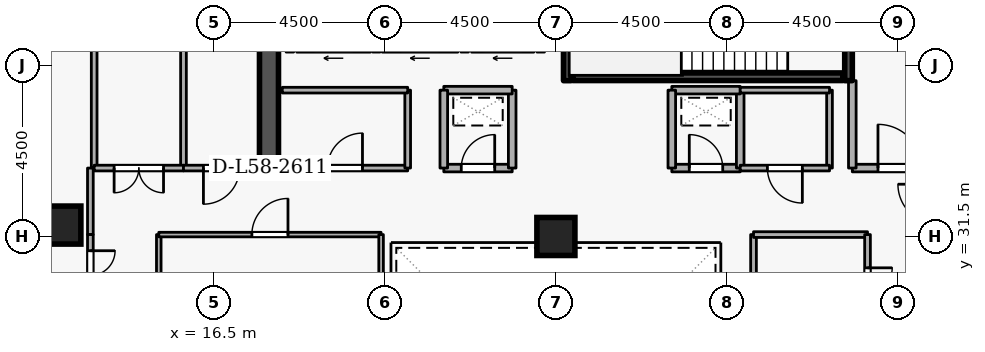
"""IFC4 building model, lengths in metres.
Left out: names, types, materials, properties, quantities, classifications, styles, units other than length and angle.
Written with IfcOpenShell. Run it as: python <this file> out.ifc"""

import sys

from ifc_helpers import new_model, si_unit, direction, frame, frame_2d, origin, origin_2d, place, context, subcontext, project, spatial, rectangle, extrude, element, fill, save


model = new_model("IFC4")
c1 = context("Model", 3, precision=1e-05, world=origin(), true_north=direction((0.0, 1.0)))
c2 = subcontext(c1, "Body", "Model", "MODEL_VIEW")
j1 = project(units=[si_unit("LENGTHUNIT", "METRE"), si_unit("PLANEANGLEUNIT", "RADIAN")], contexts=[c1])
p1 = place(None, origin())
s1 = spatial("IfcSite", under=j1, at=p1, CompositionType="ELEMENT")
p2 = place(p1, origin())
s2 = spatial("IfcBuilding", under=s1, at=p2, CompositionType="ELEMENT")
p3 = place(p2, frame((0.0, 0.0, 218.1)))
s3 = spatial("IfcBuildingStorey", under=s2, at=p3, CompositionType="ELEMENT", Elevation=218.1)
p4 = place(p3, frame((17.95, 33.1, 0.0), z_axis=(0.0, 0.0, 1.0), x_axis=(0.0, 1.0, 0.0)))
e1 = element("IfcWall", 1, at=p4, inside=s3, PredefinedType="SHEAR", context=c2, shape_type="SweptSolid", body=[
    extrude(rectangle(XDim=5.8, YDim=0.5, at=frame_2d((2.9, 0.0))), origin(), (0.0, 0.0, 1.0), 3.6),
])
for number, where, z_axis, x_axis in (
    (2, (12.5, 31.8, 0.0), (0.0, 0.0, 1.0), (1.0, 0.0, 0.0)),
    (3, (25.5, 31.5, 0.0), (0.0, 0.0, 1.0), (1.0, 0.0, 0.0)),
):
    element("IfcColumn", number, at=place(p3, frame(where, z_axis=z_axis, x_axis=x_axis)), inside=s3, PredefinedType="COLUMN", context=c2, shape_type="SweptSolid", body=[
        extrude(rectangle(XDim=1.0, YDim=1.0, at=origin_2d()), origin(), (0.0, 0.0, 1.0), 3.6),
    ])
p5 = place(p3, frame((24.92, 36.45, 0.0), z_axis=(0.0, 0.0, 1.0), x_axis=(-1.0, 0.0, 0.0)))
e4 = element("IfcWall", 4, at=p5, inside=s3, PredefinedType="STANDARD", context=c2, shape_type="SweptSolid", body=[
    extrude(rectangle(XDim=1.64, YDim=0.2, at=frame_2d((0.82, 0.0))), origin(), (0.0, 0.0, 1.0), 3.26),
])
p6 = place(p5, frame((0.31, 0.0, 0.0)))
e5 = element("IfcOpeningElement", 5, at=p6, cuts=e4, PredefinedType="OPENING", context=c2, shape_type="SweptSolid", body=[
    extrude(rectangle(XDim=1.02, YDim=2.06, at=frame_2d((0.51, 1.03))), frame((0.0, 0.11, 0.0), z_axis=(0.0, -1.0, 0.0), x_axis=(1.0, 0.0, 0.0)), (0.0, 0.0, 1.0), 0.22),
])
p7 = place(p3, frame((22.92, 36.45, 0.0), z_axis=(0.0, 0.0, 1.0), x_axis=(-1.0, 0.0, 0.0)))
e6 = element("IfcWall", 6, at=p7, inside=s3, PredefinedType="STANDARD", context=c2, shape_type="SweptSolid", body=[
    extrude(rectangle(XDim=1.99, YDim=0.2, at=frame_2d((0.995, 0.0))), origin(), (0.0, 0.0, 1.0), 3.26),
])
p8 = place(p7, frame((0.485, 0.0, 0.0)))
e7 = element("IfcOpeningElement", 7, at=p8, cuts=e6, PredefinedType="OPENING", context=c2, shape_type="SweptSolid", body=[
    extrude(rectangle(XDim=1.02, YDim=2.06, at=frame_2d((0.51, 1.03))), frame((0.0, 0.11, 0.0), z_axis=(0.0, -1.0, 0.0), x_axis=(1.0, 0.0, 0.0)), (0.0, 0.0, 1.0), 0.22),
])
p9 = place(p3, frame((20.62, 36.45, 0.0), z_axis=(0.0, 0.0, 1.0), x_axis=(-1.0, 0.0, 0.0)))
e8 = element("IfcWall", 8, at=p9, inside=s3, PredefinedType="STANDARD", context=c2, shape_type="SweptSolid", body=[
    extrude(rectangle(XDim=1.94, YDim=0.2, at=frame_2d((0.97, 0.0))), origin(), (0.0, 0.0, 1.0), 3.26),
])
p10 = place(p9, frame((0.46, 0.0, 0.0)))
e9 = element("IfcOpeningElement", 9, at=p10, cuts=e8, PredefinedType="OPENING", context=c2, shape_type="SweptSolid", body=[
    extrude(rectangle(XDim=1.02, YDim=2.06, at=frame_2d((0.51, 1.03))), frame((0.0, 0.11, 0.0), z_axis=(0.0, -1.0, 0.0), x_axis=(1.0, 0.0, 0.0)), (0.0, 0.0, 1.0), 0.22),
])
p11 = place(p3, frame((33.2, 38.95, 0.0), z_axis=(0.0, 0.0, 1.0), x_axis=(0.0, -1.0, 0.0)))
e10 = element("IfcWall", 10, at=p11, inside=s3, PredefinedType="SHEAR", context=c2, shape_type="SweptSolid", body=[
    extrude(rectangle(XDim=3.35, YDim=0.2, at=frame_2d((1.675, 0.0))), origin(), (0.0, 0.0, 1.0), 3.6),
])
p12 = place(p11, frame((1.125, 0.0, 0.0)))
e11 = element("IfcOpeningElement", 11, at=p12, cuts=e10, PredefinedType="OPENING", context=c2, shape_type="SweptSolid", body=[
    extrude(rectangle(XDim=1.1, YDim=2.1, at=frame_2d((0.55, 1.05))), frame((0.0, 0.11, 0.0), z_axis=(0.0, -1.0, 0.0), x_axis=(1.0, 0.0, 0.0)), (0.0, 0.0, 1.0), 0.22),
])
p13 = place(p3, frame((25.8, 35.6, 0.0), z_axis=(0.0, 0.0, 1.0), x_axis=(0.0, 1.0, 0.0)))
e12 = element("IfcWall", 12, at=p13, inside=s3, PredefinedType="SHEAR", context=c2, shape_type="SweptSolid", body=[
    extrude(rectangle(XDim=3.35, YDim=0.2, at=frame_2d((1.675, 0.0))), origin(), (0.0, 0.0, 1.0), 3.6),
])
p14 = place(p3, frame((25.95, 35.703, 0.0), z_axis=(0.0, 0.0, 1.0), x_axis=(1.0, 0.0, 0.0)))
e13 = element("IfcWall", 13, at=p14, inside=s3, PredefinedType="SHEAR", context=c2, shape_type="SweptSolid", body=[
    extrude(rectangle(XDim=7.1, YDim=0.2, at=frame_2d((3.55, 0.0))), origin(), (0.0, 0.0, 1.0), 3.6),
])
p15 = place(p3, frame((33.3, 33.3, 0.0), z_axis=(0.0, 0.0, 1.0), x_axis=(1.0, 0.0, 0.0)))
e14 = element("IfcWall", 14, at=p15, inside=s3, PredefinedType="STANDARD", context=c2, shape_type="SweptSolid", body=[
    extrude(rectangle(XDim=2.5, YDim=0.2, at=frame_2d((1.25, 0.0))), origin(), (0.0, 0.0, 1.0), 3.26),
])
p16 = place(p15, frame((0.675, 0.0, 0.0)))
e15 = element("IfcOpeningElement", 15, at=p16, cuts=e14, PredefinedType="OPENING", context=c2, shape_type="SweptSolid", body=[
    extrude(rectangle(XDim=1.15, YDim=2.1, at=frame_2d((0.575, 1.05))), frame((0.0, 0.11, 0.0), z_axis=(0.0, -1.0, 0.0), x_axis=(1.0, 0.0, 0.0)), (0.0, 0.0, 1.0), 0.22),
])
p17 = place(p3, frame((33.3, 35.6, 0.0), z_axis=(0.0, 0.0, 1.0), x_axis=(0.0, -1.0, 0.0)))
e16 = element("IfcWall", 16, at=p17, inside=s3, PredefinedType="STANDARD", context=c2, shape_type="SweptSolid", body=[
    extrude(rectangle(XDim=2.3, YDim=0.2, at=frame_2d((1.15, 0.0))), origin(), (0.0, 0.0, 1.0), 2.465),
])
p18 = place(p3, frame((22.55, 33.3, 0.0), z_axis=(0.0, 0.0, 1.0), x_axis=(1.0, 0.0, 0.0)))
e17 = element("IfcWall", 17, at=p18, inside=s3, PredefinedType="STANDARD", context=c2, shape_type="SweptSolid", body=[
    extrude(rectangle(XDim=1.8, YDim=0.2, at=frame_2d((0.9, 0.0))), origin(), (0.0, 0.0, 1.0), 3.26),
])
p19 = place(p18, frame((0.46, 0.0, 0.0)))
e18 = element("IfcOpeningElement", 18, at=p19, cuts=e17, PredefinedType="OPENING", context=c2, shape_type="SweptSolid", body=[
    extrude(rectangle(XDim=0.88, YDim=2.04, at=frame_2d((0.44, 1.02))), frame((0.0, 0.11, 0.0), z_axis=(0.0, -1.0, 0.0), x_axis=(1.0, 0.0, 0.0)), (0.0, 0.0, 1.0), 0.22),
])
p20 = place(p3, frame((24.35, 33.3, 0.0), z_axis=(0.0, 0.0, 1.0), x_axis=(0.0, 1.0, 0.0)))
e19 = element("IfcWall", 19, at=p20, inside=s3, PredefinedType="STANDARD", context=c2, shape_type="SweptSolid", body=[
    extrude(rectangle(XDim=2.05, YDim=0.2, at=frame_2d((1.025, 0.0))), origin(), (0.0, 0.0, 1.0), 3.26),
])
p21 = place(p3, frame((24.35, 35.35, 0.0), z_axis=(0.0, 0.0, 1.0), x_axis=(-1.0, 0.0, 0.0)))
e20 = element("IfcWall", 20, at=p21, inside=s3, PredefinedType="STANDARD", context=c2, shape_type="SweptSolid", body=[
    extrude(rectangle(XDim=1.8, YDim=0.2, at=frame_2d((0.9, 0.0))), origin(), (0.0, 0.0, 1.0), 3.26),
])
p22 = place(p3, frame((22.55, 35.35, 0.0), z_axis=(0.0, 0.0, 1.0), x_axis=(0.0, -1.0, 0.0)))
e21 = element("IfcWall", 21, at=p22, inside=s3, PredefinedType="STANDARD", context=c2, shape_type="SweptSolid", body=[
    extrude(rectangle(XDim=2.05, YDim=0.2, at=frame_2d((1.025, 0.0))), origin(), (0.0, 0.0, 1.0), 3.26),
])
p23 = place(p3, frame((28.55, 33.3, 0.0), z_axis=(0.0, 0.0, 1.0), x_axis=(1.0, 0.0, 0.0)))
e22 = element("IfcWall", 22, at=p23, inside=s3, PredefinedType="STANDARD", context=c2, shape_type="SweptSolid", body=[
    extrude(rectangle(XDim=1.8, YDim=0.2, at=frame_2d((0.9, 0.0))), origin(), (0.0, 0.0, 1.0), 3.26),
])
p24 = place(p23, frame((0.46, 0.0, 0.0)))
e23 = element("IfcOpeningElement", 23, at=p24, cuts=e22, PredefinedType="OPENING", context=c2, shape_type="SweptSolid", body=[
    extrude(rectangle(XDim=0.88, YDim=2.04, at=frame_2d((0.44, 1.02))), frame((0.0, 0.11, 0.0), z_axis=(0.0, -1.0, 0.0), x_axis=(1.0, 0.0, 0.0)), (0.0, 0.0, 1.0), 0.22),
])
p25 = place(p3, frame((30.35, 33.3, 0.0), z_axis=(0.0, 0.0, 1.0), x_axis=(0.0, 1.0, 0.0)))
e24 = element("IfcWall", 24, at=p25, inside=s3, PredefinedType="STANDARD", context=c2, shape_type="SweptSolid", body=[
    extrude(rectangle(XDim=2.05, YDim=0.2, at=frame_2d((1.025, 0.0))), origin(), (0.0, 0.0, 1.0), 3.26),
])
p26 = place(p3, frame((30.35, 35.35, 0.0), z_axis=(0.0, 0.0, 1.0), x_axis=(-1.0, 0.0, 0.0)))
e25 = element("IfcWall", 25, at=p26, inside=s3, PredefinedType="STANDARD", context=c2, shape_type="SweptSolid", body=[
    extrude(rectangle(XDim=1.8, YDim=0.2, at=frame_2d((0.9, 0.0))), origin(), (0.0, 0.0, 1.0), 3.26),
])
p27 = place(p3, frame((28.55, 35.35, 0.0), z_axis=(0.0, 0.0, 1.0), x_axis=(0.0, -1.0, 0.0)))
e26 = element("IfcWall", 26, at=p27, inside=s3, PredefinedType="STANDARD", context=c2, shape_type="SweptSolid", body=[
    extrude(rectangle(XDim=2.05, YDim=0.2, at=frame_2d((1.025, 0.0))), origin(), (0.0, 0.0, 1.0), 3.26),
])
p28 = place(p3, frame((18.3, 33.3, 0.0), z_axis=(0.0, 0.0, 1.0), x_axis=(1.0, 0.0, 0.0)))
e27 = element("IfcWall", 27, at=p28, inside=s3, PredefinedType="PARTITIONING", context=c2, shape_type="SweptSolid", body=[
    extrude(rectangle(XDim=3.3, YDim=0.15, at=frame_2d((1.65, 0.0))), origin(), (0.0, 0.0, 1.0), 3.26),
])
p29 = place(p28, frame((1.19, 0.0, 0.0)))
e28 = element("IfcOpeningElement", 28, at=p29, cuts=e27, PredefinedType="OPENING", context=c2, shape_type="SweptSolid", body=[
    extrude(rectangle(XDim=0.92, YDim=2.08, at=frame_2d((0.46, 1.04))), frame((0.0, 0.085, 0.0), z_axis=(0.0, -1.0, 0.0), x_axis=(1.0, 0.0, 0.0)), (0.0, 0.0, 1.0), 0.17),
])
p30 = place(p3, frame((21.6, 33.3, 0.0), z_axis=(0.0, 0.0, 1.0), x_axis=(0.0, 1.0, 0.0)))
e29 = element("IfcWall", 29, at=p30, inside=s3, PredefinedType="PARTITIONING", context=c2, shape_type="SweptSolid", body=[
    extrude(rectangle(XDim=2.05, YDim=0.15, at=frame_2d((1.025, 0.0))), origin(), (0.0, 0.0, 1.0), 3.26),
])
p31 = place(p3, frame((21.6, 35.35, 0.0), z_axis=(0.0, 0.0, 1.0), x_axis=(-1.0, 0.0, 0.0)))
e30 = element("IfcWall", 30, at=p31, inside=s3, PredefinedType="PARTITIONING", context=c2, shape_type="SweptSolid", body=[
    extrude(rectangle(XDim=3.3, YDim=0.15, at=frame_2d((1.65, 0.0))), origin(), (0.0, 0.0, 1.0), 3.26),
])
p32 = place(p3, frame((32.7, 35.35, 0.0), z_axis=(0.0, 0.0, 1.0), x_axis=(0.0, -1.0, 0.0)))
e31 = element("IfcWall", 31, at=p32, inside=s3, PredefinedType="PARTITIONING", context=c2, shape_type="SweptSolid", body=[
    extrude(rectangle(XDim=2.05, YDim=0.15, at=frame_2d((1.025, 0.0))), origin(), (0.0, 0.0, 1.0), 2.465),
])
p33 = place(p3, frame((32.7, 33.3, 0.0), z_axis=(0.0, 0.0, 1.0), x_axis=(-1.0, 0.0, 0.0)))
e32 = element("IfcWall", 32, at=p33, inside=s3, PredefinedType="PARTITIONING", context=c2, shape_type="SweptSolid", body=[
    extrude(rectangle(XDim=2.35, YDim=0.15, at=frame_2d((1.175, 0.0))), origin(), (0.0, 0.0, 1.0), 3.26),
])
p34 = place(p33, frame((0.715, 0.0, 0.0)))
e33 = element("IfcOpeningElement", 33, at=p34, cuts=e32, PredefinedType="OPENING", context=c2, shape_type="SweptSolid", body=[
    extrude(rectangle(XDim=0.92, YDim=2.08, at=frame_2d((0.46, 1.04))), frame((0.0, 0.085, 0.0), z_axis=(0.0, -1.0, 0.0), x_axis=(1.0, 0.0, 0.0)), (0.0, 0.0, 1.0), 0.17),
])
p35 = place(p3, frame((30.35, 35.35, 0.0), z_axis=(0.0, 0.0, 1.0), x_axis=(1.0, 0.0, 0.0)))
e34 = element("IfcWall", 34, at=p35, inside=s3, PredefinedType="PARTITIONING", context=c2, shape_type="SweptSolid", body=[
    extrude(rectangle(XDim=2.35, YDim=0.15, at=frame_2d((1.175, 0.0))), origin(), (0.0, 0.0, 1.0), 3.26),
])
for number, where, z_axis, x_axis in (
    (35, (13.35, 33.3, 0.0), (0.0, 0.0, 1.0), (0.0, 1.0, 0.0)),
    (36, (15.7, 50.72, 0.0), (0.0, 0.0, 1.0), (0.0, -1.0, 0.0)),
):
    element("IfcWall", number, at=place(p3, frame(where, z_axis=z_axis, x_axis=x_axis)), inside=s3, PredefinedType="PARTITIONING", context=c2, shape_type="SweptSolid", body=[
        extrude(rectangle(XDim=17.42, YDim=0.15, at=frame_2d((8.71, 0.0))), origin(), (0.0, 0.0, 1.0), 3.26),
    ])
p36 = place(p3, frame((15.7, 33.3, 0.0), z_axis=(0.0, 0.0, 1.0), x_axis=(-1.0, 0.0, 0.0)))
e37 = element("IfcWall", 37, at=p36, inside=s3, PredefinedType="PARTITIONING", context=c2, shape_type="SweptSolid", body=[
    extrude(rectangle(XDim=2.35, YDim=0.15, at=frame_2d((1.175, 0.0))), origin(), (0.0, 0.0, 1.0), 3.26),
])
p37 = place(p36, frame((0.525, 0.0, 0.0)))
e38 = element("IfcOpeningElement", 38, at=p37, cuts=e37, PredefinedType="OPENING", context=c2, shape_type="SweptSolid", body=[
    extrude(rectangle(XDim=1.3, YDim=2.12, at=frame_2d((0.65, 1.06))), frame((0.0, 0.085, 0.0), z_axis=(0.0, -1.0, 0.0), x_axis=(1.0, 0.0, 0.0)), (0.0, 0.0, 1.0), 0.17),
])
p38 = place(p3, frame((17.7, 33.3, 0.0), z_axis=(0.0, 0.0, 1.0), x_axis=(-1.0, 0.0, 0.0)))
e39 = element("IfcWall", 39, at=p38, inside=s3, PredefinedType="PARTITIONING", context=c2, shape_type="SweptSolid", body=[
    extrude(rectangle(XDim=2.0, YDim=0.15, at=frame_2d((1.0, 0.0))), origin(), (0.0, 0.0, 1.0), 3.26),
])
p39 = place(p38, frame((0.525, 0.0, 0.0)))
e40 = element("IfcOpeningElement", 40, at=p39, cuts=e39, PredefinedType="OPENING", context=c2, shape_type="SweptSolid", body=[
    extrude(rectangle(XDim=0.95, YDim=2.1, at=frame_2d((0.475, 1.05))), frame((0.0, 0.085, 0.0), z_axis=(0.0, -1.0, 0.0), x_axis=(1.0, 0.0, 0.0)), (0.0, 0.0, 1.0), 0.17),
])
p40 = place(p3, frame((13.25, 33.3, 0.0), z_axis=(0.0, 0.0, 1.0), x_axis=(0.0, -1.0, 0.0)))
e41 = element("IfcWall", 41, at=p40, inside=s3, PredefinedType="PARTITIONING", context=c2, shape_type="SweptSolid", body=[
    extrude(rectangle(XDim=1.75, YDim=0.15, at=frame_2d((0.875, 0.0))), origin(), (0.0, 0.0, 1.0), 3.26),
])
p41 = place(p3, frame((13.25, 31.55, 0.0), z_axis=(0.0, 0.0, 1.0), x_axis=(0.0, -1.0, 0.0)))
e42 = element("IfcWall", 42, at=p41, inside=s3, PredefinedType="PARTITIONING", context=c2, shape_type="SweptSolid", body=[
    extrude(rectangle(XDim=2.15, YDim=0.15, at=frame_2d((1.075, 0.0))), origin(), (0.0, 0.0, 1.0), 3.26),
])
p42 = place(p41, frame((0.425, 0.0, 0.0)))
e43 = element("IfcOpeningElement", 43, at=p42, cuts=e42, PredefinedType="OPENING", context=c2, shape_type="SweptSolid", body=[
    extrude(rectangle(XDim=1.3, YDim=2.12, at=frame_2d((0.65, 1.06))), frame((0.0, 0.085, 0.0), z_axis=(0.0, -1.0, 0.0), x_axis=(1.0, 0.0, 0.0)), (0.0, 0.0, 1.0), 0.17),
])
p43 = place(p3, frame((15.05, 26.2, 0.0), z_axis=(0.0, 0.0, 1.0), x_axis=(0.0, 1.0, 0.0)))
e44 = element("IfcWall", 44, at=p43, inside=s3, PredefinedType="PARTITIONING", context=c2, shape_type="SweptSolid", body=[
    extrude(rectangle(XDim=5.35, YDim=0.12, at=frame_2d((2.675, 0.0))), origin(), (0.0, 0.0, 1.0), 3.26),
])
p44 = place(p3, frame((15.05, 31.55, 0.0), z_axis=(0.0, 0.0, 1.0), x_axis=(1.0, 0.0, 0.0)))
e45 = element("IfcWall", 45, at=p44, inside=s3, PredefinedType="PARTITIONING", context=c2, shape_type="SweptSolid", body=[
    extrude(rectangle(XDim=5.85, YDim=0.12, at=frame_2d((2.925, 0.0))), origin(), (0.0, 0.0, 1.0), 3.26),
])
p45 = place(p44, frame((2.45, 0.0, 0.0)))
e46 = element("IfcOpeningElement", 46, at=p45, cuts=e45, PredefinedType="OPENING", context=c2, shape_type="SweptSolid", body=[
    extrude(rectangle(XDim=0.95, YDim=2.1, at=frame_2d((0.475, 1.05))), frame((0.0, 0.07, 0.0), z_axis=(0.0, -1.0, 0.0), x_axis=(1.0, 0.0, 0.0)), (0.0, 0.0, 1.0), 0.14),
])
p46 = place(p3, frame((20.9, 31.55, 0.0), z_axis=(0.0, 0.0, 1.0), x_axis=(0.0, -1.0, 0.0)))
e47 = element("IfcWall", 47, at=p46, inside=s3, PredefinedType="PARTITIONING", context=c2, shape_type="SweptSolid", body=[
    extrude(rectangle(XDim=5.35, YDim=0.12, at=frame_2d((2.675, 0.0))), origin(), (0.0, 0.0, 1.0), 3.26),
])
p47 = place(p3, frame((30.7, 28.5, 0.0), z_axis=(0.0, 0.0, 1.0), x_axis=(0.0, 1.0, 0.0)))
e48 = element("IfcWall", 48, at=p47, inside=s3, PredefinedType="PARTITIONING", context=c2, shape_type="SweptSolid", body=[
    extrude(rectangle(XDim=3.05, YDim=0.15, at=frame_2d((1.525, 0.0))), origin(), (0.0, 0.0, 1.0), 3.26),
])
p48 = place(p3, frame((30.7, 31.55, 0.0), z_axis=(0.0, 0.0, 1.0), x_axis=(1.0, 0.0, 0.0)))
e49 = element("IfcWall", 49, at=p48, inside=s3, PredefinedType="PARTITIONING", context=c2, shape_type="SweptSolid", body=[
    extrude(rectangle(XDim=3.0, YDim=0.15, at=frame_2d((1.5, 0.0))), origin(), (0.0, 0.0, 1.0), 3.26),
])
p49 = place(p3, frame((33.7, 31.55, 0.0), z_axis=(0.0, 0.0, 1.0), x_axis=(0.0, -1.0, 0.0)))
e50 = element("IfcWall", 50, at=p49, inside=s3, PredefinedType="PARTITIONING", context=c2, shape_type="SweptSolid", body=[
    extrude(rectangle(XDim=3.05, YDim=0.15, at=frame_2d((1.525, 0.0))), origin(), (0.0, 0.0, 1.0), 3.26),
])
p50 = place(p49, frame((0.875, 0.0, 0.0)))
e51 = element("IfcOpeningElement", 51, at=p50, cuts=e50, PredefinedType="OPENING", context=c2, shape_type="SweptSolid", body=[
    extrude(rectangle(XDim=1.3, YDim=2.12, at=frame_2d((0.65, 1.06))), frame((0.0, 0.085, 0.0), z_axis=(0.0, -1.0, 0.0), x_axis=(1.0, 0.0, 0.0)), (0.0, 0.0, 1.0), 0.17),
])
p51 = place(p16, origin())
e52 = element("IfcDoor", 52, at=p51, inside=s3, OperationType="SINGLE_SWING_LEFT", PredefinedType="DOOR", context=c2, shape_type="SweptSolid", body=[
    extrude(rectangle(XDim=1.15, YDim=2.1, at=frame_2d((0.575, 1.05))), frame((0.0, 0.025, 0.0), z_axis=(0.0, -1.0, 0.0), x_axis=(1.0, 0.0, 0.0)), (0.0, 0.0, 1.0), 0.05),
])
fill(e15, e52)
p52 = place(p19, origin())
e53 = element("IfcDoor", 53, at=p52, inside=s3, OperationType="SINGLE_SWING_RIGHT", PredefinedType="DOOR", context=c2, shape_type="SweptSolid", body=[
    extrude(rectangle(XDim=0.88, YDim=2.04, at=frame_2d((0.44, 1.02))), frame((0.0, 0.025, 0.0), z_axis=(0.0, -1.0, 0.0), x_axis=(1.0, 0.0, 0.0)), (0.0, 0.0, 1.0), 0.05),
])
fill(e18, e53)
p53 = place(p24, origin())
e54 = element("IfcDoor", 54, at=p53, inside=s3, OperationType="SINGLE_SWING_LEFT", PredefinedType="DOOR", context=c2, shape_type="SweptSolid", body=[
    extrude(rectangle(XDim=0.88, YDim=2.04, at=frame_2d((0.44, 1.02))), frame((0.0, 0.025, 0.0), z_axis=(0.0, -1.0, 0.0), x_axis=(1.0, 0.0, 0.0)), (0.0, 0.0, 1.0), 0.05),
])
fill(e23, e54)
p54 = place(p29, origin())
e55 = element("IfcDoor", 55, at=p54, inside=s3, OperationType="SINGLE_SWING_RIGHT", PredefinedType="DOOR", context=c2, shape_type="SweptSolid", body=[
    extrude(rectangle(XDim=0.92, YDim=2.08, at=frame_2d((0.46, 1.04))), frame((0.0, 0.025, 0.0), z_axis=(0.0, -1.0, 0.0), x_axis=(1.0, 0.0, 0.0)), (0.0, 0.0, 1.0), 0.05),
])
fill(e28, e55)
p55 = place(p34, origin())
e56 = element("IfcDoor", 56, at=p55, inside=s3, OperationType="SINGLE_SWING_LEFT", PredefinedType="DOOR", context=c2, shape_type="SweptSolid", body=[
    extrude(rectangle(XDim=0.92, YDim=2.08, at=frame_2d((0.46, 1.04))), frame((0.0, 0.025, 0.0), z_axis=(0.0, -1.0, 0.0), x_axis=(1.0, 0.0, 0.0)), (0.0, 0.0, 1.0), 0.05),
])
fill(e33, e56)
p56 = place(p37, origin())
e57 = element("IfcDoor", 57, at=p56, inside=s3, OperationType="DOUBLE_DOOR_SINGLE_SWING", PredefinedType="DOOR", context=c2, shape_type="SweptSolid", body=[
    extrude(rectangle(XDim=1.3, YDim=2.12, at=frame_2d((0.65, 1.06))), frame((0.0, 0.025, 0.0), z_axis=(0.0, -1.0, 0.0), x_axis=(1.0, 0.0, 0.0)), (0.0, 0.0, 1.0), 0.05),
])
fill(e38, e57)
p57 = place(p39, origin())
e58 = element("IfcDoor", 58, at=p57, inside=s3, OperationType="SINGLE_SWING_RIGHT", PredefinedType="DOOR", context=c2, shape_type="SweptSolid", body=[
    extrude(rectangle(XDim=0.95, YDim=2.1, at=frame_2d((0.475, 1.05))), frame((0.0, 0.025, 0.0), z_axis=(0.0, -1.0, 0.0), x_axis=(1.0, 0.0, 0.0)), (0.0, 0.0, 1.0), 0.05),
])
fill(e40, e58)
p58 = place(p42, origin())
e59 = element("IfcDoor", 59, at=p58, inside=s3, OperationType="DOUBLE_DOOR_SINGLE_SWING", PredefinedType="DOOR", context=c2, shape_type="SweptSolid", body=[
    extrude(rectangle(XDim=1.3, YDim=2.12, at=frame_2d((0.65, 1.06))), frame((0.0, 0.025, 0.0), z_axis=(0.0, -1.0, 0.0), x_axis=(1.0, 0.0, 0.0)), (0.0, 0.0, 1.0), 0.05),
])
fill(e43, e59)
p59 = place(p45, origin())
e60 = element("IfcDoor", 60, at=p59, inside=s3, OperationType="SINGLE_SWING_RIGHT", PredefinedType="DOOR", context=c2, shape_type="SweptSolid", body=[
    extrude(rectangle(XDim=0.95, YDim=2.1, at=frame_2d((0.475, 1.05))), frame((0.0, 0.025, 0.0), z_axis=(0.0, -1.0, 0.0), x_axis=(1.0, 0.0, 0.0)), (0.0, 0.0, 1.0), 0.05),
])
fill(e46, e60)
p60 = place(p50, origin())
e61 = element("IfcDoor", 61, at=p60, inside=s3, OperationType="DOUBLE_DOOR_SINGLE_SWING", PredefinedType="DOOR", context=c2, shape_type="SweptSolid", body=[
    extrude(rectangle(XDim=1.3, YDim=2.12, at=frame_2d((0.65, 1.06))), frame((0.0, 0.025, 0.0), z_axis=(0.0, -1.0, 0.0), x_axis=(1.0, 0.0, 0.0)), (0.0, 0.0, 1.0), 0.05),
])
fill(e51, e61)
save(model, sys.argv[1])
